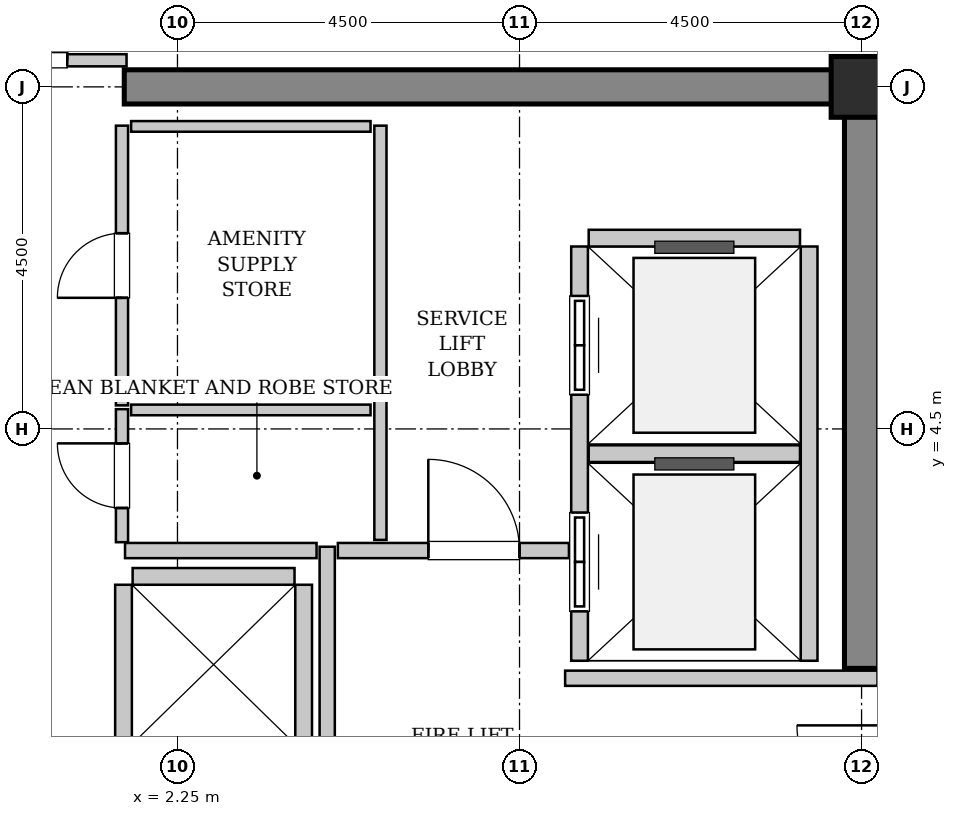
"""IFC4 building model, lengths in metres.
Left out: names, types, materials, properties, quantities, classifications, styles, units other than length and angle.
Written with IfcOpenShell. Run it as: python <this file> out.ifc"""

import sys

from ifc_helpers import new_model, si_unit, direction, frame, frame_2d, origin, origin_2d, place, context, subcontext, project, spatial, rectangle, hollow_rectangle, extrude, source, transform, mapped, element, fill, save


model = new_model("IFC4")
c1 = context("Model", 3, precision=1e-05, world=origin(), true_north=direction((0.0, 1.0)))
c2 = subcontext(c1, "Body", "Model", "MODEL_VIEW")
j1 = project(units=[si_unit("LENGTHUNIT", "METRE"), si_unit("PLANEANGLEUNIT", "RADIAN")], contexts=[c1])
p1 = place(None, origin())
s1 = spatial("IfcSite", under=j1, at=p1, CompositionType="ELEMENT")
p2 = place(p1, origin())
s2 = spatial("IfcBuilding", under=s1, at=p2, CompositionType="ELEMENT")
p3 = place(p2, frame((0.0, 0.0, 283.6)))
s3 = spatial("IfcBuildingStorey", under=s2, at=p3, CompositionType="ELEMENT", Elevation=283.6)
m1 = source(origin(), c2, "Body", "SweptSolid", [
    extrude(rectangle(XDim=9.925, YDim=0.45, at=frame_2d((4.962, 0.0))), origin(), (0.0, 0.0, 1.0), 3.8),
])
p4 = place(p3, frame((1.55, 9.0, 0.0), z_axis=(0.0, 0.0, 1.0), x_axis=(1.0, 0.0, 0.0)))
e1 = element("IfcWall", 1, at=p4, inside=s3, PredefinedType="SHEAR", context=c2, shape_type="MappedRepresentation", body=[
    mapped(m1, transform((0.0, 0.0, 0.0), x_axis=(1.0, 0.0, 0.0), y_axis=(0.0, 1.0, 0.0), z_axis=(0.0, 0.0, 1.0), scale=1.0)),
])
m2 = source(origin(), c2, "Body", "SweptSolid", [
    extrude(rectangle(XDim=7.425, YDim=0.45, at=frame_2d((3.712, 0.0))), origin(), (0.0, 0.0, 1.0), 3.8),
])
p5 = place(p3, frame((11.25, 1.35, 0.0), z_axis=(0.0, 0.0, 1.0), x_axis=(0.0, 1.0, 0.0)))
e2 = element("IfcWall", 2, at=p5, inside=s3, PredefinedType="SHEAR", context=c2, shape_type="MappedRepresentation", body=[
    mapped(m2, transform((0.0, 0.0, 0.0), x_axis=(1.0, 0.0, 0.0), y_axis=(0.0, 1.0, 0.0), z_axis=(0.0, 0.0, 1.0), scale=1.0)),
])
m3 = source(origin(), c2, "Body", "SweptSolid", [
    extrude(hollow_rectangle(XDim=0.8, YDim=0.8, WallThickness=0.04, InnerFilletRadius=0.04, OuterFilletRadius=0.08, at=origin_2d()), origin(), (0.0, 0.0, 1.0), 3.8),
])
p6 = place(p3, frame((11.25, 9.0, 0.0), z_axis=(0.0, 0.0, 1.0), x_axis=(1.0, 0.0, 0.0)))
e3 = element("IfcColumn", 3, at=p6, inside=s3, PredefinedType="COLUMN", context=c2, shape_type="MappedRepresentation", body=[
    mapped(m3, transform((0.0, 0.0, 0.0), x_axis=(1.0, 0.0, 0.0), y_axis=(0.0, 1.0, 0.0), z_axis=(0.0, 0.0, 1.0), scale=1.0)),
])
m4 = source(origin(), c2, "Body", "SweptSolid", [
    extrude(rectangle(XDim=5.45, YDim=0.22, at=frame_2d((2.725, 0.0))), origin(), (0.0, 0.0, 1.0), 3.535),
])
p7 = place(p3, frame((7.54, 6.9, 0.0), z_axis=(0.0, 0.0, 1.0), x_axis=(0.0, -1.0, 0.0)))
e4 = element("IfcWall", 4, at=p7, inside=s3, PredefinedType="SOLIDWALL", context=c2, shape_type="MappedRepresentation", body=[
    mapped(m4, transform((0.0, 0.0, 0.0), x_axis=(1.0, 0.0, 0.0), y_axis=(0.0, 1.0, 0.0), z_axis=(0.0, 0.0, 1.0), scale=1.0)),
])
p8 = place(p7, frame((3.5, 0.0, 0.0)))
e5 = element("IfcOpeningElement", 5, at=p8, cuts=e4, PredefinedType="OPENING", context=c2, shape_type="SweptSolid", body=[
    extrude(rectangle(XDim=1.3, YDim=2.3, at=frame_2d((0.65, 1.15))), frame((0.0, 0.12, 0.0), z_axis=(0.0, -1.0, 0.0), x_axis=(1.0, 0.0, 0.0)), (0.0, 0.0, 1.0), 0.24),
])
p9 = place(p7, frame((0.65, 0.0, 0.0)))
e6 = element("IfcOpeningElement", 6, at=p9, cuts=e4, PredefinedType="OPENING", context=c2, shape_type="SweptSolid", body=[
    extrude(rectangle(XDim=1.3, YDim=2.3, at=frame_2d((0.65, 1.15))), frame((0.0, 0.12, 0.0), z_axis=(0.0, -1.0, 0.0), x_axis=(1.0, 0.0, 0.0)), (0.0, 0.0, 1.0), 0.24),
])
p10 = place(p3, frame((10.56, 1.45, 0.0), z_axis=(0.0, 0.0, 1.0), x_axis=(0.0, 1.0, 0.0)))
e7 = element("IfcWall", 7, at=p10, inside=s3, PredefinedType="SOLIDWALL", context=c2, shape_type="MappedRepresentation", body=[
    mapped(m4, transform((0.0, 0.0, 0.0), x_axis=(1.0, 0.0, 0.0), y_axis=(0.0, 1.0, 0.0), z_axis=(0.0, 0.0, 1.0), scale=1.0)),
])
m5 = source(origin(), c2, "Body", "SweptSolid", [
    extrude(rectangle(XDim=2.78, YDim=0.22, at=frame_2d((1.39, 0.0))), origin(), (0.0, 0.0, 1.0), 3.535),
])
for number, where, z_axis, x_axis in (
    (8, (7.66, 4.175, 0.0), (0.0, 0.0, 1.0), (1.0, 0.0, 0.0)),
    (9, (10.44, 7.01, 0.0), (0.0, 0.0, 1.0), (-1.0, 0.0, 0.0)),
):
    element("IfcWall", number, at=place(p3, frame(where, z_axis=z_axis, x_axis=x_axis)), inside=s3, PredefinedType="SOLIDWALL", context=c2, shape_type="MappedRepresentation", body=[
        mapped(m5, transform((0.0, 0.0, 0.0), x_axis=(1.0, 0.0, 0.0), y_axis=(0.0, 1.0, 0.0), z_axis=(0.0, 0.0, 1.0), scale=1.0)),
    ])
m6 = source(origin(), c2, "Body", "SweptSolid", [
    extrude(rectangle(XDim=4.9, YDim=0.22, at=frame_2d((2.45, 0.0))), origin(), (0.0, 0.0, 1.0), 3.535),
])
for number, where, z_axis, x_axis in (
    (10, (1.54, 2.45, 0.0), (0.0, 0.0, 1.0), (0.0, -1.0, 0.0)),
    (11, (3.91, -2.45, 0.0), (0.0, 0.0, 1.0), (0.0, 1.0, 0.0)),
):
    element("IfcWall", number, at=place(p3, frame(where, z_axis=z_axis, x_axis=x_axis)), inside=s3, PredefinedType="SOLIDWALL", context=c2, shape_type="MappedRepresentation", body=[
        mapped(m6, transform((0.0, 0.0, 0.0), x_axis=(1.0, 0.0, 0.0), y_axis=(0.0, 1.0, 0.0), z_axis=(0.0, 0.0, 1.0), scale=1.0)),
    ])
m7 = source(origin(), c2, "Body", "SweptSolid", [
    extrude(rectangle(XDim=2.13, YDim=0.22, at=frame_2d((1.065, 0.0))), origin(), (0.0, 0.0, 1.0), 3.535),
])
p11 = place(p3, frame((3.79, 2.56, 0.0), z_axis=(0.0, 0.0, 1.0), x_axis=(-1.0, 0.0, 0.0)))
e12 = element("IfcWall", 12, at=p11, inside=s3, PredefinedType="SOLIDWALL", context=c2, shape_type="MappedRepresentation", body=[
    mapped(m7, transform((0.0, 0.0, 0.0), x_axis=(1.0, 0.0, 0.0), y_axis=(0.0, 1.0, 0.0), z_axis=(0.0, 0.0, 1.0), scale=1.0)),
])
m8 = source(origin(), c2, "Body", "SweptSolid", [
    extrude(rectangle(XDim=5.9, YDim=0.2, at=frame_2d((2.95, 0.0))), origin(), (0.0, 0.0, 1.0), 3.535),
])
p12 = place(p3, frame((4.22, -2.95, 0.0), z_axis=(0.0, 0.0, 1.0), x_axis=(0.0, 1.0, 0.0)))
e13 = element("IfcWall", 13, at=p12, inside=s3, PredefinedType="PARTITIONING", context=c2, shape_type="MappedRepresentation", body=[
    mapped(m8, transform((0.0, 0.0, 0.0), x_axis=(1.0, 0.0, 0.0), y_axis=(0.0, 1.0, 0.0), z_axis=(0.0, 0.0, 1.0), scale=1.0)),
])
m9 = source(origin(), c2, "Body", "SweptSolid", [
    extrude(rectangle(XDim=2.52, YDim=0.2, at=frame_2d((1.26, 0.0))), origin(), (0.0, 0.0, 1.0), 3.535),
])
p13 = place(p3, frame((1.56, 2.9, 0.0), z_axis=(0.0, 0.0, 1.0), x_axis=(1.0, 0.0, 0.0)))
e14 = element("IfcWall", 14, at=p13, inside=s3, PredefinedType="PARTITIONING", context=c2, shape_type="MappedRepresentation", body=[
    mapped(m9, transform((0.0, 0.0, 0.0), x_axis=(1.0, 0.0, 0.0), y_axis=(0.0, 1.0, 0.0), z_axis=(0.0, 0.0, 1.0), scale=1.0)),
])
m10 = source(origin(), c2, "Body", "SweptSolid", [
    extrude(rectangle(XDim=3.04, YDim=0.2, at=frame_2d((1.52, 0.0))), origin(), (0.0, 0.0, 1.0), 3.535),
])
p14 = place(p3, frame((4.36, 2.9, 0.0), z_axis=(0.0, 0.0, 1.0), x_axis=(1.0, 0.0, 0.0)))
e15 = element("IfcWall", 15, at=p14, inside=s3, PredefinedType="PARTITIONING", context=c2, shape_type="MappedRepresentation", body=[
    mapped(m10, transform((0.0, 0.0, 0.0), x_axis=(1.0, 0.0, 0.0), y_axis=(0.0, 1.0, 0.0), z_axis=(0.0, 0.0, 1.0), scale=1.0)),
])
p15 = place(p14, frame((1.19, 0.0, 0.0)))
e16 = element("IfcOpeningElement", 16, at=p15, cuts=e15, PredefinedType="OPENING", context=c2, shape_type="SweptSolid", body=[
    extrude(rectangle(XDim=1.2, YDim=2.15, at=frame_2d((0.6, 1.075))), frame((0.0, 0.11, 0.0), z_axis=(0.0, -1.0, 0.0), x_axis=(1.0, 0.0, 0.0)), (0.0, 0.0, 1.0), 0.22),
])
m11 = source(origin(), c2, "Body", "SweptSolid", [
    extrude(rectangle(XDim=4.11, YDim=0.2, at=frame_2d((2.055, 0.0))), origin(), (0.0, 0.0, 1.0), 3.535),
])
p16 = place(p3, frame((7.35, 1.22, 0.0), z_axis=(0.0, 0.0, 1.0), x_axis=(1.0, 0.0, 0.0)))
e17 = element("IfcWall", 17, at=p16, inside=s3, PredefinedType="PARTITIONING", context=c2, shape_type="MappedRepresentation", body=[
    mapped(m11, transform((0.0, 0.0, 0.0), x_axis=(1.0, 0.0, 0.0), y_axis=(0.0, 1.0, 0.0), z_axis=(0.0, 0.0, 1.0), scale=1.0)),
])
m12 = source(origin(), c2, "Body", "SweptSolid", [
    extrude(rectangle(XDim=3.16, YDim=0.16, at=frame_2d((1.58, 0.0))), origin(), (0.0, 0.0, 1.0), 2.625),
])
p17 = place(p3, frame((-1.58, 9.35, 0.0), z_axis=(0.0, 0.0, 1.0), x_axis=(1.0, 0.0, 0.0)))
e18 = element("IfcWall", 18, at=p17, inside=s3, PredefinedType="PARTITIONING", context=c2, shape_type="MappedRepresentation", body=[
    mapped(m12, transform((0.0, 0.0, 0.0), x_axis=(1.0, 0.0, 0.0), y_axis=(0.0, 1.0, 0.0), z_axis=(0.0, 0.0, 1.0), scale=1.0)),
])
p18 = place(p17, frame((0.78, 0.0, 0.0)))
e19 = element("IfcOpeningElement", 19, at=p18, cuts=e18, PredefinedType="OPENING", context=c2, shape_type="SweptSolid", body=[
    extrude(rectangle(XDim=1.6, YDim=2.3, at=frame_2d((0.8, 1.15))), frame((0.0, 0.09, 0.0), z_axis=(0.0, -1.0, 0.0), x_axis=(1.0, 0.0, 0.0)), (0.0, 0.0, 1.0), 0.18),
])
m13 = source(origin(), c2, "Body", "SweptSolid", [
    extrude(rectangle(XDim=5.45, YDim=0.16, at=frame_2d((2.725, 0.0))), origin(), (0.0, 0.0, 1.0), 3.535),
])
p19 = place(p3, frame((4.92, 3.04, 0.0), z_axis=(0.0, 0.0, 1.0), x_axis=(0.0, 1.0, 0.0)))
e20 = element("IfcWall", 20, at=p19, inside=s3, PredefinedType="PARTITIONING", context=c2, shape_type="MappedRepresentation", body=[
    mapped(m13, transform((0.0, 0.0, 0.0), x_axis=(1.0, 0.0, 0.0), y_axis=(0.0, 1.0, 0.0), z_axis=(0.0, 0.0, 1.0), scale=1.0)),
])
m14 = source(origin(), c2, "Body", "SweptSolid", [
    extrude(rectangle(XDim=1.75, YDim=0.16, at=frame_2d((0.875, 0.0))), origin(), (0.0, 0.0, 1.0), 3.535),
])
p20 = place(p3, frame((1.52, 3.01, 0.0), z_axis=(0.0, 0.0, 1.0), x_axis=(0.0, 1.0, 0.0)))
e21 = element("IfcWall", 21, at=p20, inside=s3, PredefinedType="PARTITIONING", context=c2, shape_type="MappedRepresentation", body=[
    mapped(m14, transform((0.0, 0.0, 0.0), x_axis=(1.0, 0.0, 0.0), y_axis=(0.0, 1.0, 0.0), z_axis=(0.0, 0.0, 1.0), scale=1.0)),
])
p21 = place(p20, frame((0.45, 0.0, 0.0)))
e22 = element("IfcOpeningElement", 22, at=p21, cuts=e21, PredefinedType="OPENING", context=c2, shape_type="SweptSolid", body=[
    extrude(rectangle(XDim=0.85, YDim=2.1, at=frame_2d((0.425, 1.05))), frame((0.0, 0.09, 0.0), z_axis=(0.0, -1.0, 0.0), x_axis=(1.0, 0.0, 0.0)), (0.0, 0.0, 1.0), 0.18),
])
m15 = source(origin(), c2, "Body", "SweptSolid", [
    extrude(rectangle(XDim=3.15, YDim=0.14, at=frame_2d((1.575, 0.0))), origin(), (0.0, 0.0, 1.0), 3.535),
])
p22 = place(p3, frame((1.64, 4.75, 0.0), z_axis=(0.0, 0.0, 1.0), x_axis=(1.0, 0.0, 0.0)))
e23 = element("IfcWall", 23, at=p22, inside=s3, PredefinedType="PARTITIONING", context=c2, shape_type="MappedRepresentation", body=[
    mapped(m15, transform((0.0, 0.0, 0.0), x_axis=(1.0, 0.0, 0.0), y_axis=(0.0, 1.0, 0.0), z_axis=(0.0, 0.0, 1.0), scale=1.0)),
])
m16 = source(origin(), c2, "Body", "SweptSolid", [
    extrude(rectangle(XDim=3.68, YDim=0.16, at=frame_2d((1.84, 0.0))), origin(), (0.0, 0.0, 1.0), 3.535),
])
p23 = place(p3, frame((1.52, 4.81, 0.0), z_axis=(0.0, 0.0, 1.0), x_axis=(0.0, 1.0, 0.0)))
e24 = element("IfcWall", 24, at=p23, inside=s3, PredefinedType="PARTITIONING", context=c2, shape_type="MappedRepresentation", body=[
    mapped(m16, transform((0.0, 0.0, 0.0), x_axis=(1.0, 0.0, 0.0), y_axis=(0.0, 1.0, 0.0), z_axis=(0.0, 0.0, 1.0), scale=1.0)),
])
p24 = place(p23, frame((1.415, 0.0, 0.0)))
e25 = element("IfcOpeningElement", 25, at=p24, cuts=e24, PredefinedType="OPENING", context=c2, shape_type="SweptSolid", body=[
    extrude(rectangle(XDim=0.85, YDim=2.1, at=frame_2d((0.425, 1.05))), frame((0.0, 0.09, 0.0), z_axis=(0.0, -1.0, 0.0), x_axis=(1.0, 0.0, 0.0)), (0.0, 0.0, 1.0), 0.18),
])
p25 = place(p3, frame((1.64, 8.48, 0.0), z_axis=(0.0, 0.0, 1.0), x_axis=(1.0, 0.0, 0.0)))
e26 = element("IfcWall", 26, at=p25, inside=s3, PredefinedType="PARTITIONING", context=c2, shape_type="MappedRepresentation", body=[
    mapped(m15, transform((0.0, 0.0, 0.0), x_axis=(1.0, 0.0, 0.0), y_axis=(0.0, 1.0, 0.0), z_axis=(0.0, 0.0, 1.0), scale=1.0)),
])
m17 = source(origin(), c2, "Body", "SweptSolid", [
    extrude(rectangle(XDim=1.3, YDim=2.3, at=frame_2d((0.65, 1.15))), frame((0.0, 0.025, 0.0), z_axis=(0.0, -1.0, 0.0), x_axis=(1.0, 0.0, 0.0)), (0.0, 0.0, 1.0), 0.05),
])
p26 = place(p8, origin())
e27 = element("IfcDoor", 27, at=p26, inside=s3, OperationType="SLIDING_TO_RIGHT", PredefinedType="DOOR", context=c2, shape_type="MappedRepresentation", body=[
    mapped(m17, transform((0.0, 0.0, 0.0), x_axis=(1.0, 0.0, 0.0), y_axis=(0.0, 1.0, 0.0), z_axis=(0.0, 0.0, 1.0), scale=1.0)),
])
fill(e5, e27)
p27 = place(p9, origin())
e28 = element("IfcDoor", 28, at=p27, inside=s3, OperationType="SLIDING_TO_RIGHT", PredefinedType="DOOR", context=c2, shape_type="MappedRepresentation", body=[
    mapped(m17, transform((0.0, 0.0, 0.0), x_axis=(1.0, 0.0, 0.0), y_axis=(0.0, 1.0, 0.0), z_axis=(0.0, 0.0, 1.0), scale=1.0)),
])
fill(e6, e28)
m18 = source(origin(), c2, "Body", "SweptSolid", [
    extrude(rectangle(XDim=1.2, YDim=2.15, at=frame_2d((0.6, 1.075))), frame((0.0, 0.025, 0.0), z_axis=(0.0, -1.0, 0.0), x_axis=(1.0, 0.0, 0.0)), (0.0, 0.0, 1.0), 0.05),
])
p28 = place(p15, origin())
e29 = element("IfcDoor", 29, at=p28, inside=s3, OperationType="SINGLE_SWING_LEFT", PredefinedType="DOOR", context=c2, shape_type="MappedRepresentation", body=[
    mapped(m18, transform((0.0, 0.0, 0.0), x_axis=(1.0, 0.0, 0.0), y_axis=(0.0, 1.0, 0.0), z_axis=(0.0, 0.0, 1.0), scale=1.0)),
])
fill(e16, e29)
m19 = source(origin(), c2, "Body", "SweptSolid", [
    extrude(rectangle(XDim=1.6, YDim=2.3, at=frame_2d((0.8, 1.15))), frame((0.0, 0.025, 0.0), z_axis=(0.0, -1.0, 0.0), x_axis=(1.0, 0.0, 0.0)), (0.0, 0.0, 1.0), 0.05),
])
p29 = place(p18, origin())
e30 = element("IfcDoor", 30, at=p29, inside=s3, OperationType="DOUBLE_DOOR_SINGLE_SWING", PredefinedType="DOOR", context=c2, shape_type="MappedRepresentation", body=[
    mapped(m19, transform((0.0, 0.0, 0.0), x_axis=(1.0, 0.0, 0.0), y_axis=(0.0, 1.0, 0.0), z_axis=(0.0, 0.0, 1.0), scale=1.0)),
])
fill(e19, e30)
m20 = source(origin(), c2, "Body", "SweptSolid", [
    extrude(rectangle(XDim=0.85, YDim=2.1, at=frame_2d((0.425, 1.05))), frame((0.0, 0.025, 0.0), z_axis=(0.0, -1.0, 0.0), x_axis=(1.0, 0.0, 0.0)), (0.0, 0.0, 1.0), 0.05),
])
p30 = place(p21, origin())
e31 = element("IfcDoor", 31, at=p30, inside=s3, OperationType="SINGLE_SWING_RIGHT", PredefinedType="DOOR", context=c2, shape_type="MappedRepresentation", body=[
    mapped(m20, transform((0.0, 0.0, 0.0), x_axis=(1.0, 0.0, 0.0), y_axis=(0.0, 1.0, 0.0), z_axis=(0.0, 0.0, 1.0), scale=1.0)),
])
fill(e22, e31)
p31 = place(p24, origin())
e32 = element("IfcDoor", 32, at=p31, inside=s3, OperationType="SINGLE_SWING_LEFT", PredefinedType="DOOR", context=c2, shape_type="MappedRepresentation", body=[
    mapped(m20, transform((0.0, 0.0, 0.0), x_axis=(1.0, 0.0, 0.0), y_axis=(0.0, 1.0, 0.0), z_axis=(0.0, 0.0, 1.0), scale=1.0)),
])
fill(e25, e32)
save(model, sys.argv[1])
